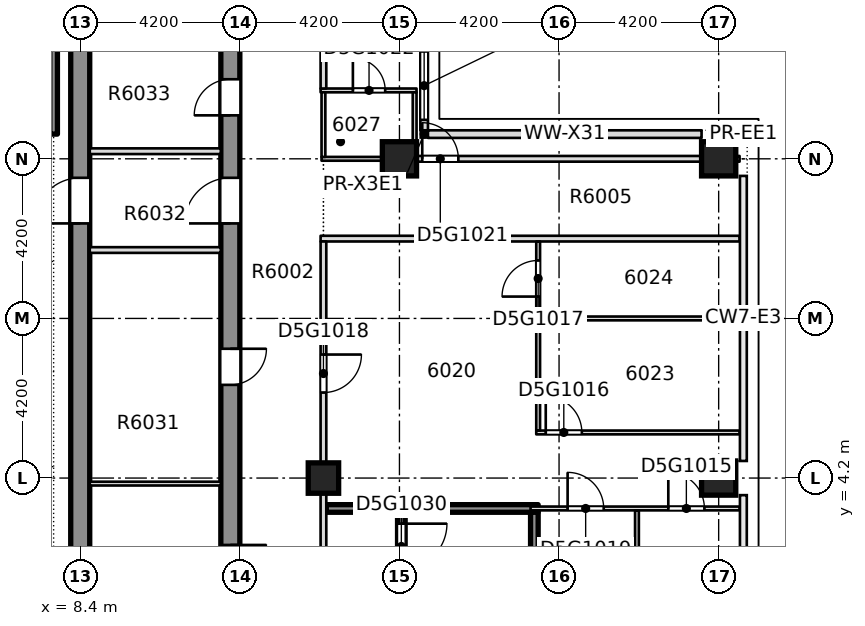
"""IFC4 building model, lengths in metres.
Left out: names, types, materials, properties, quantities, classifications, styles, units other than length and angle.
Written with IfcOpenShell. Run it as: python <this file> out.ifc"""

import sys

from ifc_helpers import new_model, si_unit, direction, frame, frame_2d, origin, origin_2d, place, context, subcontext, project, spatial, rectangle, extrude, element, fill, save


model = new_model("IFC4")
c1 = context("Model", 3, precision=1e-05, world=origin(), true_north=direction((0.0, 1.0)))
c2 = subcontext(c1, "Body", "Model", "MODEL_VIEW")
j1 = project(units=[si_unit("LENGTHUNIT", "METRE"), si_unit("PLANEANGLEUNIT", "RADIAN")], contexts=[c1])
p1 = place(None, origin())
s1 = spatial("IfcSite", under=j1, at=p1, CompositionType="ELEMENT")
p2 = place(p1, origin())
s2 = spatial("IfcBuilding", under=s1, at=p2, CompositionType="ELEMENT")
p3 = place(p2, frame((0.0, 0.0, 230.35)))
s3 = spatial("IfcBuildingStorey", under=s2, at=p3, CompositionType="ELEMENT", Elevation=230.35)
p4 = place(p3, frame((12.35, -8.4, -0.4), z_axis=(0.0, 0.0, 1.0), x_axis=(0.0, 1.0, 0.0)))
e1 = element("IfcWall", 1, at=p4, inside=s3, PredefinedType="SHEAR", context=c2, shape_type="SweptSolid", body=[
    extrude(rectangle(XDim=30.15, YDim=0.5, at=frame_2d((15.075, 0.0))), origin(), (0.0, 0.0, 1.0), 3.45),
])
p5 = place(p4, frame((4.113, 0.0, 0.4)))
e2 = element("IfcOpeningElement", 2, at=p5, cuts=e1, PredefinedType="OPENING", context=c2, shape_type="SweptSolid", body=[
    extrude(rectangle(XDim=0.95, YDim=2.1, at=frame_2d((0.475, 1.05))), frame((0.0, 0.26, 0.0), z_axis=(0.0, -1.0, 0.0), x_axis=(1.0, 0.0, 0.0)), (0.0, 0.0, 1.0), 0.52),
])
p6 = place(p4, frame((9.89, 0.0, 0.4)))
e3 = element("IfcOpeningElement", 3, at=p6, cuts=e1, PredefinedType="OPENING", context=c2, shape_type="SweptSolid", body=[
    extrude(rectangle(XDim=0.95, YDim=2.1, at=frame_2d((0.475, 1.05))), frame((0.0, 0.26, 0.0), z_axis=(0.0, -1.0, 0.0), x_axis=(1.0, 0.0, 0.0)), (0.0, 0.0, 1.0), 0.52),
])
p7 = place(p4, frame((15.052, 0.0, 0.4)))
e4 = element("IfcOpeningElement", 4, at=p7, cuts=e1, PredefinedType="OPENING", context=c2, shape_type="SweptSolid", body=[
    extrude(rectangle(XDim=0.95, YDim=2.1, at=frame_2d((0.475, 1.05))), frame((0.0, 0.26, 0.0), z_axis=(0.0, -1.0, 0.0), x_axis=(1.0, 0.0, 0.0)), (0.0, 0.0, 1.0), 0.52),
])
p8 = place(p4, frame((22.144, 0.0, 0.4)))
e5 = element("IfcOpeningElement", 5, at=p8, cuts=e1, PredefinedType="OPENING", context=c2, shape_type="SweptSolid", body=[
    extrude(rectangle(XDim=0.95, YDim=2.1, at=frame_2d((0.475, 1.05))), frame((0.0, 0.26, 0.0), z_axis=(0.0, -1.0, 0.0), x_axis=(1.0, 0.0, 0.0)), (0.0, 0.0, 1.0), 0.52),
])
p9 = place(p4, frame((24.998, 0.0, 0.4)))
e6 = element("IfcOpeningElement", 6, at=p9, cuts=e1, PredefinedType="OPENING", context=c2, shape_type="SweptSolid", body=[
    extrude(rectangle(XDim=0.95, YDim=2.1, at=frame_2d((0.475, 1.05))), frame((0.0, 0.26, 0.0), z_axis=(0.0, -1.0, 0.0), x_axis=(1.0, 0.0, 0.0)), (0.0, 0.0, 1.0), 0.52),
])
p10 = place(p4, frame((27.605, 0.0, 0.4)))
e7 = element("IfcOpeningElement", 7, at=p10, cuts=e1, PredefinedType="OPENING", context=c2, shape_type="SweptSolid", body=[
    extrude(rectangle(XDim=0.95, YDim=2.1, at=frame_2d((0.475, 1.05))), frame((0.0, 0.26, 0.0), z_axis=(0.0, -1.0, 0.0), x_axis=(1.0, 0.0, 0.0)), (0.0, 0.0, 1.0), 0.52),
])
p11 = place(p4, frame((19.3, 0.0, 0.4)))
e8 = element("IfcOpeningElement", 8, at=p11, cuts=e1, PredefinedType="OPENING", context=c2, shape_type="SweptSolid", body=[
    extrude(rectangle(XDim=1.2, YDim=2.1, at=frame_2d((0.6, 1.05))), frame((0.0, 0.26, 0.0), z_axis=(0.0, -1.0, 0.0), x_axis=(1.0, 0.0, 0.0)), (0.0, 0.0, 1.0), 0.52),
])
p12 = place(p3, frame((8.4, -7.9, -0.4), z_axis=(0.0, 0.0, 1.0), x_axis=(0.0, 1.0, 0.0)))
e9 = element("IfcWall", 9, at=p12, inside=s3, PredefinedType="SHEAR", context=c2, shape_type="SweptSolid", body=[
    extrude(rectangle(XDim=29.15, YDim=0.5, at=frame_2d((14.575, 0.0))), origin(), (0.0, 0.0, 1.0), 3.45),
])
p13 = place(p12, frame((18.8, 0.0, 0.4)))
e10 = element("IfcOpeningElement", 10, at=p13, cuts=e9, PredefinedType="OPENING", context=c2, shape_type="SweptSolid", body=[
    extrude(rectangle(XDim=1.2, YDim=2.1, at=frame_2d((0.6, 1.05))), frame((0.0, 0.26, 0.0), z_axis=(0.0, -1.0, 0.0), x_axis=(1.0, 0.0, 0.0)), (0.0, 0.0, 1.0), 0.52),
])
for number, where, z_axis, x_axis in (
    (11, (25.2, 4.2, -0.4), (0.0, 0.0, 1.0), (1.0, 0.0, 0.0)),
    (12, (16.8, 12.6, -0.4), (0.0, 0.0, 1.0), (1.0, 0.0, 0.0)),
    (13, (25.2, 12.6, -0.4), (0.0, 0.0, 1.0), (1.0, 0.0, 0.0)),
):
    element("IfcColumn", number, at=place(p3, frame(where, z_axis=z_axis, x_axis=x_axis)), inside=s3, PredefinedType="COLUMN", context=c2, shape_type="SweptSolid", body=[
        extrude(rectangle(XDim=0.9, YDim=0.9, at=origin_2d()), origin(), (0.0, 0.0, 1.0), 3.45),
    ])
p14 = place(p3, frame((14.8, 4.2, -0.4), z_axis=(0.0, 0.0, 1.0), x_axis=(1.0, 0.0, 0.0)))
e14 = element("IfcColumn", 14, at=p14, inside=s3, PredefinedType="COLUMN", context=c2, shape_type="SweptSolid", body=[
    extrude(rectangle(XDim=0.8, YDim=0.8, at=origin_2d()), origin(), (0.0, 0.0, 1.0), 3.45),
])
p15 = place(p3, frame((14.875, 3.4, 0.0), z_axis=(0.0, 0.0, 1.0), x_axis=(1.0, 0.0, 0.0)))
e15 = element("IfcWall", 15, at=p15, inside=s3, PredefinedType="SOLIDWALL", context=c2, shape_type="SweptSolid", body=[
    extrude(rectangle(XDim=5.575, YDim=0.2, at=frame_2d((2.788, 0.0))), origin(), (0.0, 0.0, 1.0), 3.05),
])
p16 = place(p3, frame((20.25, 3.4, 0.0), z_axis=(0.0, 0.0, 1.0), x_axis=(1.0, 0.0, 0.0)))
e16 = element("IfcWall", 16, at=p16, inside=s3, PredefinedType="PARTITIONING", context=c2, shape_type="SweptSolid", body=[
    extrude(rectangle(XDim=5.5, YDim=0.1, at=frame_2d((2.75, 0.0))), origin(), (0.0, 0.0, 1.0), 3.05),
])
p17 = place(p16, frame((3.625, 0.0, 0.0)))
e17 = element("IfcOpeningElement", 17, at=p17, cuts=e16, PredefinedType="OPENING", context=c2, shape_type="SweptSolid", body=[
    extrude(rectangle(XDim=0.95, YDim=2.1, at=frame_2d((0.475, 1.05))), frame((0.0, 0.06, 0.0), z_axis=(0.0, -1.0, 0.0), x_axis=(1.0, 0.0, 0.0)), (0.0, 0.0, 1.0), 0.12),
])
p18 = place(p16, frame((0.975, 0.0, 0.0)))
e18 = element("IfcOpeningElement", 18, at=p18, cuts=e16, PredefinedType="OPENING", context=c2, shape_type="SweptSolid", body=[
    extrude(rectangle(XDim=0.95, YDim=2.1, at=frame_2d((0.475, 1.05))), frame((0.0, 0.06, 0.0), z_axis=(0.0, -1.0, 0.0), x_axis=(1.0, 0.0, 0.0)), (0.0, 0.0, 1.0), 0.12),
])
p19 = place(p3, frame((20.4, 5.4, 0.0), z_axis=(0.0, 0.0, 1.0), x_axis=(1.0, 0.0, 0.0)))
e19 = element("IfcWall", 19, at=p19, inside=s3, PredefinedType="PARTITIONING", context=c2, shape_type="SweptSolid", body=[
    extrude(rectangle(XDim=5.35, YDim=0.1, at=frame_2d((2.675, 0.0))), origin(), (0.0, 0.0, 1.0), 3.05),
])
p20 = place(p19, frame((0.25, 0.0, 0.0)))
e20 = element("IfcOpeningElement", 20, at=p20, cuts=e19, PredefinedType="OPENING", context=c2, shape_type="SweptSolid", body=[
    extrude(rectangle(XDim=0.95, YDim=2.1, at=frame_2d((0.475, 1.05))), frame((0.0, 0.06, 0.0), z_axis=(0.0, -1.0, 0.0), x_axis=(1.0, 0.0, 0.0)), (0.0, 0.0, 1.0), 0.12),
])
p21 = place(p3, frame((20.5, 8.4, 0.0), z_axis=(0.0, 0.0, 1.0), x_axis=(1.0, 0.0, 0.0)))
e21 = element("IfcWall", 21, at=p21, inside=s3, PredefinedType="PARTITIONING", context=c2, shape_type="SweptSolid", body=[
    extrude(rectangle(XDim=5.25, YDim=0.1, at=frame_2d((2.625, 0.0))), origin(), (0.0, 0.0, 1.0), 3.05),
])
p22 = place(p3, frame((14.725, 10.5, 0.0), z_axis=(0.0, 0.0, 1.0), x_axis=(1.0, 0.0, 0.0)))
e22 = element("IfcWall", 22, at=p22, inside=s3, PredefinedType="PARTITIONING", context=c2, shape_type="SweptSolid", body=[
    extrude(rectangle(XDim=11.025, YDim=0.15, at=frame_2d((5.512, 0.0))), origin(), (0.0, 0.0, 1.0), 3.05),
])
p23 = place(p3, frame((14.75, 12.6, 0.0), z_axis=(0.0, 0.0, 1.0), x_axis=(1.0, 0.0, 0.0)))
e23 = element("IfcWall", 23, at=p23, inside=s3, PredefinedType="PARTITIONING", context=c2, shape_type="SweptSolid", body=[
    extrude(rectangle(XDim=2.5, YDim=0.1, at=frame_2d((1.25, 0.0))), origin(), (0.0, 0.0, 1.0), 3.05),
])
p24 = place(p3, frame((17.15, 12.6, 0.0), z_axis=(0.0, 0.0, 1.0), x_axis=(1.0, 0.0, 0.0)))
e24 = element("IfcWall", 24, at=p24, inside=s3, PredefinedType="PARTITIONING", context=c2, shape_type="SweptSolid", body=[
    extrude(rectangle(XDim=0.1, YDim=0.15, at=frame_2d((0.05, 0.0))), origin(), (0.0, 0.0, 1.0), 3.05),
])
p25 = place(p3, frame((14.725, 14.4, 0.0), z_axis=(0.0, 0.0, 1.0), x_axis=(1.0, 0.0, 0.0)))
e25 = element("IfcWall", 25, at=p25, inside=s3, PredefinedType="PARTITIONING", context=c2, shape_type="SweptSolid", body=[
    extrude(rectangle(XDim=2.525, YDim=0.1, at=frame_2d((1.262, 0.0))), origin(), (0.0, 0.0, 1.0), 3.05),
])
p26 = place(p25, frame((0.85, 0.0, 0.0)))
e26 = element("IfcOpeningElement", 26, at=p26, cuts=e25, PredefinedType="OPENING", context=c2, shape_type="SweptSolid", body=[
    extrude(rectangle(XDim=0.85, YDim=2.1, at=frame_2d((0.425, 1.05))), frame((0.0, 0.06, 0.0), z_axis=(0.0, -1.0, 0.0), x_axis=(1.0, 0.0, 0.0)), (0.0, 0.0, 1.0), 0.12),
])
p27 = place(p3, frame((14.8, -10.55, 0.0), z_axis=(0.0, 0.0, 1.0), x_axis=(0.0, 1.0, 0.0)))
e27 = element("IfcWall", 27, at=p27, inside=s3, PredefinedType="PARTITIONING", context=c2, shape_type="SweptSolid", body=[
    extrude(rectangle(XDim=20.975, YDim=0.15, at=frame_2d((10.488, 0.0))), origin(), (0.0, 0.0, 1.0), 3.05),
])
p28 = place(p27, frame((1.0, 0.0, 0.0)))
e28 = element("IfcOpeningElement", 28, at=p28, cuts=e27, PredefinedType="OPENING", context=c2, shape_type="SweptSolid", body=[
    extrude(rectangle(XDim=0.95, YDim=2.1, at=frame_2d((0.475, 1.05))), frame((0.0, 0.085, 0.0), z_axis=(0.0, -1.0, 0.0), x_axis=(1.0, 0.0, 0.0)), (0.0, 0.0, 1.0), 0.17),
])
p29 = place(p27, frame((17.0, 0.0, 0.0)))
e29 = element("IfcOpeningElement", 29, at=p29, cuts=e27, PredefinedType="OPENING", context=c2, shape_type="SweptSolid", body=[
    extrude(rectangle(XDim=1.0, YDim=2.1, at=frame_2d((0.5, 1.05))), frame((0.0, 0.085, 0.0), z_axis=(0.0, -1.0, 0.0), x_axis=(1.0, 0.0, 0.0)), (0.0, 0.0, 1.0), 0.17),
])
p30 = place(p27, frame((10.0, 0.0, 0.0)))
e30 = element("IfcOpeningElement", 30, at=p30, cuts=e27, PredefinedType="OPENING", context=c2, shape_type="SweptSolid", body=[
    extrude(rectangle(XDim=1.1, YDim=2.1, at=frame_2d((0.55, 1.05))), frame((0.0, 0.085, 0.0), z_axis=(0.0, -1.0, 0.0), x_axis=(1.0, 0.0, 0.0)), (0.0, 0.0, 1.0), 0.17),
])
p31 = place(p27, frame((4.85, 0.0, 0.0)))
e31 = element("IfcOpeningElement", 31, at=p31, cuts=e27, PredefinedType="OPENING", context=c2, shape_type="SweptSolid", body=[
    extrude(rectangle(XDim=1.0, YDim=2.1, at=frame_2d((0.5, 1.05))), frame((0.0, 0.085, 0.0), z_axis=(0.0, -1.0, 0.0), x_axis=(1.0, 0.0, 0.0)), (0.0, 0.0, 1.0), 0.17),
])
p32 = place(p3, frame((14.8, 12.65, 0.0), z_axis=(0.0, 0.0, 1.0), x_axis=(0.0, 1.0, 0.0)))
e32 = element("IfcWall", 32, at=p32, inside=s3, PredefinedType="PARTITIONING", context=c2, shape_type="SweptSolid", body=[
    extrude(rectangle(XDim=1.7, YDim=0.1, at=frame_2d((0.85, 0.0))), origin(), (0.0, 0.0, 1.0), 3.05),
])
p33 = place(p3, frame((14.8, 14.45, 0.0), z_axis=(0.0, 0.0, 1.0), x_axis=(0.0, 1.0, 0.0)))
e33 = element("IfcWall", 33, at=p33, inside=s3, PredefinedType="PARTITIONING", context=c2, shape_type="SweptSolid", body=[
    extrude(rectangle(XDim=7.1, YDim=0.15, at=frame_2d((3.55, 0.0))), origin(), (0.0, 0.0, 1.0), 3.05),
])
p34 = place(p3, frame((16.85, -3.3, 0.0), z_axis=(0.0, 0.0, 1.0), x_axis=(0.0, 1.0, 0.0)))
e34 = element("IfcWall", 34, at=p34, inside=s3, PredefinedType="SOLIDWALL", context=c2, shape_type="SweptSolid", body=[
    extrude(rectangle(XDim=6.6, YDim=0.2, at=frame_2d((3.3, 0.0))), origin(), (0.0, 0.0, 1.0), 3.05),
])
p35 = place(p34, frame((5.1, 0.0, 0.0)))
e35 = element("IfcOpeningElement", 35, at=p35, cuts=e34, PredefinedType="OPENING", context=c2, shape_type="SweptSolid", body=[
    extrude(rectangle(XDim=1.2, YDim=2.1, at=frame_2d((0.6, 1.05))), frame((0.0, 0.11, 0.0), z_axis=(0.0, -1.0, 0.0), x_axis=(1.0, 0.0, 0.0)), (0.0, 0.0, 1.0), 0.22),
])
p36 = place(p3, frame((17.2, 12.675, 0.0), z_axis=(0.0, 0.0, 1.0), x_axis=(0.0, 1.0, 0.0)))
e36 = element("IfcWall", 36, at=p36, inside=s3, PredefinedType="PARTITIONING", context=c2, shape_type="SweptSolid", body=[
    extrude(rectangle(XDim=1.675, YDim=0.1, at=frame_2d((0.837, 0.0))), origin(), (0.0, 0.0, 1.0), 3.05),
])
p37 = place(p3, frame((20.35, -0.83, 0.0), z_axis=(0.0, 0.0, 1.0), x_axis=(0.0, 1.0, 0.0)))
e37 = element("IfcWall", 37, at=p37, inside=s3, PredefinedType="SOLIDWALL", context=c2, shape_type="SweptSolid", body=[
    extrude(rectangle(XDim=4.13, YDim=0.2, at=frame_2d((2.065, 0.0))), origin(), (0.0, 0.0, 1.0), 3.05),
])
p38 = place(p3, frame((20.45, 5.45, 0.0), z_axis=(0.0, 0.0, 1.0), x_axis=(0.0, 1.0, 0.0)))
e38 = element("IfcWall", 38, at=p38, inside=s3, PredefinedType="PARTITIONING", context=c2, shape_type="SweptSolid", body=[
    extrude(rectangle(XDim=4.975, YDim=0.1, at=frame_2d((2.488, 0.0))), origin(), (0.0, 0.0, 1.0), 3.05),
])
p39 = place(p38, frame((3.525, 0.0, 0.0)))
e39 = element("IfcOpeningElement", 39, at=p39, cuts=e38, PredefinedType="OPENING", context=c2, shape_type="SweptSolid", body=[
    extrude(rectangle(XDim=0.95, YDim=2.1, at=frame_2d((0.475, 1.05))), frame((0.0, 0.06, 0.0), z_axis=(0.0, -1.0, 0.0), x_axis=(1.0, 0.0, 0.0)), (0.0, 0.0, 1.0), 0.12),
])
p40 = place(p3, frame((23.05, -3.3, 0.0), z_axis=(0.0, 0.0, 1.0), x_axis=(0.0, 1.0, 0.0)))
e40 = element("IfcWall", 40, at=p40, inside=s3, PredefinedType="PARTITIONING", context=c2, shape_type="SweptSolid", body=[
    extrude(rectangle(XDim=6.65, YDim=0.1, at=frame_2d((3.325, 0.0))), origin(), (0.0, 0.0, 1.0), 3.05),
])
p41 = place(p3, frame((24.75, 13.25, 0.0), z_axis=(0.0, 0.0, 1.0), x_axis=(-1.0, 0.0, 0.0)))
e41 = element("IfcWall", 41, at=p41, inside=s3, PredefinedType="STANDARD", context=c2, shape_type="SweptSolid", body=[
    extrude(rectangle(XDim=7.2, YDim=0.2, at=frame_2d((3.6, 0.0))), origin(), (0.0, 0.0, 1.0), 3.05),
])
p42 = place(p3, frame((17.45, 13.35, 0.0), z_axis=(0.0, 0.0, 1.0), x_axis=(0.0, 1.0, 0.0)))
e42 = element("IfcWall", 42, at=p42, inside=s3, PredefinedType="STANDARD", context=c2, shape_type="SweptSolid", body=[
    extrude(rectangle(XDim=7.2, YDim=0.2, at=frame_2d((3.6, 0.0))), origin(), (0.0, 0.0, 1.0), 3.05),
])
p43 = place(p42, frame((0.275, 0.0, 0.2)))
e43 = element("IfcOpeningElement", 43, at=p43, cuts=e42, PredefinedType="OPENING", context=c2, shape_type="SweptSolid", body=[
    extrude(rectangle(XDim=1.8, YDim=2.65, at=frame_2d((0.9, 1.325))), frame((0.0, 0.11, 0.0), z_axis=(0.0, -1.0, 0.0), x_axis=(1.0, 0.0, 0.0)), (0.0, 0.0, 1.0), 0.22),
])
p44 = place(p42, frame((3.875, 0.0, 0.2)))
e44 = element("IfcOpeningElement", 44, at=p44, cuts=e42, PredefinedType="OPENING", context=c2, shape_type="SweptSolid", body=[
    extrude(rectangle(XDim=1.8, YDim=2.65, at=frame_2d((0.9, 1.325))), frame((0.0, 0.11, 0.0), z_axis=(0.0, -1.0, 0.0), x_axis=(1.0, 0.0, 0.0)), (0.0, 0.0, 1.0), 0.22),
])
p45 = place(p3, frame((8.651, 4.054, 0.0), z_axis=(0.0, 0.0, 1.0), x_axis=(1.0, 0.0, 0.0)))
e45 = element("IfcWall", 45, at=p45, inside=s3, PredefinedType="PARTITIONING", context=c2, shape_type="SweptSolid", body=[
    extrude(rectangle(XDim=3.448, YDim=0.1, at=frame_2d((1.724, 0.0))), origin(), (0.0, 0.0, 1.0), 3.05),
])
for number, where, z_axis, x_axis in (
    (46, (8.651, 10.2, 0.0), (0.0, 0.0, 1.0), (1.0, 0.0, 0.0)),
    (47, (8.651, 12.8, 0.0), (0.0, 0.0, 1.0), (1.0, 0.0, 0.0)),
):
    element("IfcWall", number, at=place(p3, frame(where, z_axis=z_axis, x_axis=x_axis)), inside=s3, PredefinedType="PARTITIONING", context=c2, shape_type="SweptSolid", body=[
        extrude(rectangle(XDim=3.448, YDim=0.15, at=frame_2d((1.724, 0.0))), origin(), (0.0, 0.0, 1.0), 3.05),
    ])
p46 = place(p3, frame((7.7, 13.25, 0.0), z_axis=(0.0, 0.0, 1.0), x_axis=(0.0, 1.0, 0.0)))
e48 = element("IfcWall", 48, at=p46, inside=s3, PredefinedType="SOLIDWALL", context=c2, shape_type="SweptSolid", body=[
    extrude(rectangle(XDim=7.6, YDim=0.2, at=frame_2d((3.8, 0.0))), origin(), (0.0, 0.0, 1.0), 3.05),
])
p47 = place(p3, frame((17.25, 12.6, 0.0), z_axis=(0.0, 0.0, 1.0), x_axis=(1.0, 0.0, 0.0)))
e49 = element("IfcWall", 49, at=p47, inside=s3, PredefinedType="PARTITIONING", context=c2, shape_type="SweptSolid", body=[
    extrude(rectangle(XDim=7.5, YDim=0.15, at=frame_2d((3.75, 0.0))), origin(), (0.0, 0.0, 1.0), 2.5),
])
p48 = place(p47, frame((0.15, 0.0, 0.0)))
e50 = element("IfcOpeningElement", 50, at=p48, cuts=e49, PredefinedType="OPENING", context=c2, shape_type="SweptSolid", body=[
    extrude(rectangle(XDim=0.95, YDim=2.1, at=frame_2d((0.475, 1.05))), frame((0.0, 0.085, 0.0), z_axis=(0.0, -1.0, 0.0), x_axis=(1.0, 0.0, 0.0)), (0.0, 0.0, 1.0), 0.17),
])
p49 = place(p3, frame((24.75, 12.6, 0.0), z_axis=(0.0, 0.0, 1.0), x_axis=(1.0, 0.0, 0.0)))
e51 = element("IfcWall", 51, at=p49, inside=s3, PredefinedType="PARTITIONING", context=c2, shape_type="SweptSolid", body=[
    extrude(rectangle(XDim=1.0, YDim=0.15, at=frame_2d((0.5, 0.0))), origin(), (0.0, 0.0, 1.0), 3.05),
])
p50 = place(p17, origin())
e52 = element("IfcDoor", 52, at=p50, inside=s3, OperationType="SINGLE_SWING_LEFT", PredefinedType="DOOR", context=c2, shape_type="SweptSolid", body=[
    extrude(rectangle(XDim=0.95, YDim=2.1, at=frame_2d((0.475, 1.05))), frame((0.0, 0.025, 0.0), z_axis=(0.0, -1.0, 0.0), x_axis=(1.0, 0.0, 0.0)), (0.0, 0.0, 1.0), 0.05),
])
fill(e17, e52)
p51 = place(p20, origin())
e53 = element("IfcDoor", 53, at=p51, inside=s3, OperationType="SINGLE_SWING_LEFT", PredefinedType="DOOR", context=c2, shape_type="SweptSolid", body=[
    extrude(rectangle(XDim=0.95, YDim=2.1, at=frame_2d((0.475, 1.05))), frame((0.0, 0.025, 0.0), z_axis=(0.0, -1.0, 0.0), x_axis=(1.0, 0.0, 0.0)), (0.0, 0.0, 1.0), 0.05),
])
fill(e20, e53)
p52 = place(p39, origin())
e54 = element("IfcDoor", 54, at=p52, inside=s3, OperationType="SINGLE_SWING_RIGHT", PredefinedType="DOOR", context=c2, shape_type="SweptSolid", body=[
    extrude(rectangle(XDim=0.95, YDim=2.1, at=frame_2d((0.475, 1.05))), frame((0.0, 0.025, 0.0), z_axis=(0.0, -1.0, 0.0), x_axis=(1.0, 0.0, 0.0)), (0.0, 0.0, 1.0), 0.05),
])
fill(e39, e54)
p53 = place(p29, origin())
e55 = element("IfcDoor", 55, at=p53, inside=s3, OperationType="SINGLE_SWING_RIGHT", PredefinedType="DOOR", context=c2, shape_type="SweptSolid", body=[
    extrude(rectangle(XDim=1.0, YDim=2.1, at=frame_2d((0.5, 1.05))), frame((0.0, 0.025, 0.0), z_axis=(0.0, -1.0, 0.0), x_axis=(1.0, 0.0, 0.0)), (0.0, 0.0, 1.0), 0.05),
])
fill(e29, e55)
p54 = place(p18, origin())
e56 = element("IfcDoor", 56, at=p54, inside=s3, OperationType="SINGLE_SWING_RIGHT", PredefinedType="DOOR", context=c2, shape_type="SweptSolid", body=[
    extrude(rectangle(XDim=0.95, YDim=2.1, at=frame_2d((0.475, 1.05))), frame((0.0, 0.025, 0.0), z_axis=(0.0, -1.0, 0.0), x_axis=(1.0, 0.0, 0.0)), (0.0, 0.0, 1.0), 0.05),
])
fill(e18, e56)
p55 = place(p48, origin())
e57 = element("IfcDoor", 57, at=p55, inside=s3, OperationType="SINGLE_SWING_LEFT", PredefinedType="DOOR", context=c2, shape_type="SweptSolid", body=[
    extrude(rectangle(XDim=0.95, YDim=2.1, at=frame_2d((0.475, 1.05))), frame((0.0, 0.025, 0.0), z_axis=(0.0, -1.0, 0.0), x_axis=(1.0, 0.0, 0.0)), (0.0, 0.0, 1.0), 0.05),
])
fill(e50, e57)
p56 = place(p26, origin())
e58 = element("IfcDoor", 58, at=p56, inside=s3, OperationType="SINGLE_SWING_RIGHT", PredefinedType="DOOR", context=c2, shape_type="SweptSolid", body=[
    extrude(rectangle(XDim=0.85, YDim=2.1, at=frame_2d((0.425, 1.05))), frame((0.0, 0.025, 0.0), z_axis=(0.0, -1.0, 0.0), x_axis=(1.0, 0.0, 0.0)), (0.0, 0.0, 1.0), 0.05),
])
fill(e26, e58)
p57 = place(p35, origin())
e59 = element("IfcDoor", 59, at=p57, inside=s3, OperationType="SINGLE_SWING_LEFT", PredefinedType="DOOR", context=c2, shape_type="SweptSolid", body=[
    extrude(rectangle(XDim=1.2, YDim=2.1, at=frame_2d((0.6, 1.05))), frame((0.0, 0.025, 0.0), z_axis=(0.0, -1.0, 0.0), x_axis=(1.0, 0.0, 0.0)), (0.0, 0.0, 1.0), 0.05),
])
fill(e35, e59)
p58 = place(p43, origin())
e60 = element("IfcWindow", 60, at=p58, inside=s3, PartitioningType="SINGLE_PANEL", PredefinedType="WINDOW", context=c2, shape_type="SweptSolid", body=[
    extrude(rectangle(XDim=1.8, YDim=2.65, at=frame_2d((0.9, 1.325))), frame((0.0, 0.03, 0.0), z_axis=(0.0, -1.0, 0.0), x_axis=(1.0, 0.0, 0.0)), (0.0, 0.0, 1.0), 0.06),
])
fill(e43, e60)
p59 = place(p6, origin())
e61 = element("IfcDoor", 61, at=p59, inside=s3, OperationType="SINGLE_SWING_LEFT", PredefinedType="DOOR", context=c2, shape_type="SweptSolid", body=[
    extrude(rectangle(XDim=0.95, YDim=2.1, at=frame_2d((0.475, 1.05))), frame((0.0, 0.025, 0.0), z_axis=(0.0, -1.0, 0.0), x_axis=(1.0, 0.0, 0.0)), (0.0, 0.0, 1.0), 0.05),
])
fill(e3, e61)
p60 = place(p7, origin())
e62 = element("IfcDoor", 62, at=p60, inside=s3, OperationType="SINGLE_SWING_LEFT", PredefinedType="DOOR", context=c2, shape_type="SweptSolid", body=[
    extrude(rectangle(XDim=0.95, YDim=2.1, at=frame_2d((0.475, 1.05))), frame((0.0, 0.025, 0.0), z_axis=(0.0, -1.0, 0.0), x_axis=(1.0, 0.0, 0.0)), (0.0, 0.0, 1.0), 0.05),
])
fill(e4, e62)
p61 = place(p8, origin())
e63 = element("IfcDoor", 63, at=p61, inside=s3, OperationType="SINGLE_SWING_LEFT", PredefinedType="DOOR", context=c2, shape_type="SweptSolid", body=[
    extrude(rectangle(XDim=0.95, YDim=2.1, at=frame_2d((0.475, 1.05))), frame((0.0, 0.025, 0.0), z_axis=(0.0, -1.0, 0.0), x_axis=(1.0, 0.0, 0.0)), (0.0, 0.0, 1.0), 0.05),
])
fill(e5, e63)
p62 = place(p11, origin())
e64 = element("IfcDoor", 64, at=p62, inside=s3, OperationType="SINGLE_SWING_LEFT", PredefinedType="DOOR", context=c2, shape_type="SweptSolid", body=[
    extrude(rectangle(XDim=1.2, YDim=2.1, at=frame_2d((0.6, 1.05))), frame((0.0, 0.025, 0.0), z_axis=(0.0, -1.0, 0.0), x_axis=(1.0, 0.0, 0.0)), (0.0, 0.0, 1.0), 0.05),
])
fill(e8, e64)
p63 = place(p13, origin())
e65 = element("IfcDoor", 65, at=p63, inside=s3, OperationType="SINGLE_SWING_LEFT", PredefinedType="DOOR", context=c2, shape_type="SweptSolid", body=[
    extrude(rectangle(XDim=1.2, YDim=2.1, at=frame_2d((0.6, 1.05))), frame((0.0, 0.025, 0.0), z_axis=(0.0, -1.0, 0.0), x_axis=(1.0, 0.0, 0.0)), (0.0, 0.0, 1.0), 0.05),
])
fill(e10, e65)
save(model, sys.argv[1])
